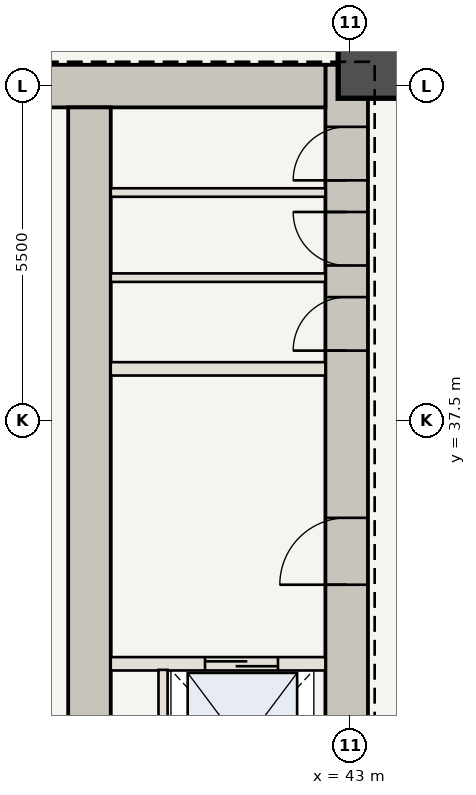
"""IFC4 building model, lengths in metres.
Left out: names, types, materials, properties, quantities, classifications, styles, units other than length and angle.
Written with IfcOpenShell. Run it as: python <this file> out.ifc"""

import sys

from ifc_helpers import new_model, si_unit, direction, frame, frame_2d, origin, origin_2d, place, context, subcontext, project, spatial, rectangle, extrude, element, fill, save


model = new_model("IFC4")
c1 = context("Model", 3, precision=1e-05, world=origin(), true_north=direction((0.0, 1.0)))
c2 = subcontext(c1, "Body", "Model", "MODEL_VIEW")
j1 = project(units=[si_unit("LENGTHUNIT", "METRE"), si_unit("PLANEANGLEUNIT", "RADIAN")], contexts=[c1])
p1 = place(None, origin())
s1 = spatial("IfcSite", under=j1, at=p1, CompositionType="ELEMENT")
p2 = place(p1, origin())
s2 = spatial("IfcBuilding", under=s1, at=p2, CompositionType="ELEMENT")
p3 = place(p2, frame((0.0, 0.0, 52.85)))
s3 = spatial("IfcBuildingStorey", under=s2, at=p3, CompositionType="ELEMENT", Elevation=52.85)
p4 = place(p3, frame((42.94, 30.6, 0.0), z_axis=(0.0, 0.0, 1.0), x_axis=(0.0, 1.0, 0.0)))
e1 = element("IfcWall", 1, at=p4, inside=s3, PredefinedType="SHEAR", context=c2, shape_type="SweptSolid", body=[
    extrude(rectangle(XDim=12.75, YDim=0.7, at=frame_2d((6.375, 0.0))), origin(), (0.0, 0.0, 1.0), 3.5),
])
p5 = place(p4, frame((4.2, 0.0, 0.0)))
e2 = element("IfcOpeningElement", 2, at=p5, cuts=e1, PredefinedType="OPENING", context=c2, shape_type="SweptSolid", body=[
    extrude(rectangle(XDim=1.1, YDim=2.15, at=frame_2d((0.55, 1.075))), frame((0.0, 0.36, 0.0), z_axis=(0.0, -1.0, 0.0), x_axis=(1.0, 0.0, 0.0)), (0.0, 0.0, 1.0), 0.72),
])
p6 = place(p4, frame((8.05, 0.0, 0.0)))
e3 = element("IfcOpeningElement", 3, at=p6, cuts=e1, PredefinedType="OPENING", context=c2, shape_type="SweptSolid", body=[
    extrude(rectangle(XDim=0.88, YDim=2.1, at=frame_2d((0.44, 1.05))), frame((0.0, 0.36, 0.0), z_axis=(0.0, -1.0, 0.0), x_axis=(1.0, 0.0, 0.0)), (0.0, 0.0, 1.0), 0.72),
])
p7 = place(p4, frame((9.45, 0.0, 0.0)))
e4 = element("IfcOpeningElement", 4, at=p7, cuts=e1, PredefinedType="OPENING", context=c2, shape_type="SweptSolid", body=[
    extrude(rectangle(XDim=0.88, YDim=2.1, at=frame_2d((0.44, 1.05))), frame((0.0, 0.36, 0.0), z_axis=(0.0, -1.0, 0.0), x_axis=(1.0, 0.0, 0.0)), (0.0, 0.0, 1.0), 0.72),
])
p8 = place(p4, frame((10.85, 0.0, 0.0)))
e5 = element("IfcOpeningElement", 5, at=p8, cuts=e1, PredefinedType="OPENING", context=c2, shape_type="SweptSolid", body=[
    extrude(rectangle(XDim=0.88, YDim=2.1, at=frame_2d((0.44, 1.05))), frame((0.0, 0.36, 0.0), z_axis=(0.0, -1.0, 0.0), x_axis=(1.0, 0.0, 0.0)), (0.0, 0.0, 1.0), 0.72),
])
p9 = place(p3, frame((37.75, 43.0, 0.0), z_axis=(0.0, 0.0, 1.0), x_axis=(1.0, 0.0, 0.0)))
e6 = element("IfcWall", 6, at=p9, inside=s3, PredefinedType="SHEAR", context=c2, shape_type="SweptSolid", body=[
    extrude(rectangle(XDim=4.84, YDim=0.7, at=frame_2d((2.42, 0.0))), origin(), (0.0, 0.0, 1.0), 3.5),
])
p10 = place(p3, frame((38.71, 30.6, 0.0), z_axis=(0.0, 0.0, 1.0), x_axis=(0.0, 1.0, 0.0)))
e7 = element("IfcWall", 7, at=p10, inside=s3, PredefinedType="SHEAR", context=c2, shape_type="SweptSolid", body=[
    extrude(rectangle(XDim=12.05, YDim=0.7, at=frame_2d((6.025, 0.0))), origin(), (0.0, 0.0, 1.0), 3.5),
])
p11 = place(p3, frame((43.35, 43.35, 0.0), z_axis=(0.0, 0.0, 1.0), x_axis=(1.0, 0.0, 0.0)))
e8 = element("IfcColumn", 8, at=p11, inside=s3, PredefinedType="COLUMN", context=c2, shape_type="SweptSolid", body=[
    extrude(rectangle(XDim=1.1, YDim=1.1, at=origin_2d()), origin(), (0.0, 0.0, 1.0), 3.5),
])
p12 = place(p3, frame((39.06, 33.5, 0.0), z_axis=(0.0, 0.0, 1.0), x_axis=(1.0, 0.0, 0.0)))
e9 = element("IfcWall", 9, at=p12, inside=s3, PredefinedType="STANDARD", context=c2, shape_type="SweptSolid", body=[
    extrude(rectangle(XDim=3.53, YDim=0.22, at=frame_2d((1.765, 0.0))), origin(), (0.0, 0.0, 1.0), 3.32),
])
p13 = place(p12, frame((1.55, 0.0, 0.0)))
e10 = element("IfcOpeningElement", 10, at=p13, cuts=e9, PredefinedType="OPENING", context=c2, shape_type="SweptSolid", body=[
    extrude(rectangle(XDim=1.2, YDim=2.2, at=frame_2d((0.6, 1.1))), frame((0.0, 0.12, 0.0), z_axis=(0.0, -1.0, 0.0), x_axis=(1.0, 0.0, 0.0)), (0.0, 0.0, 1.0), 0.24),
])
p14 = place(p3, frame((39.92, 30.75, 0.0), z_axis=(0.0, 0.0, 1.0), x_axis=(0.0, 1.0, 0.0)))
e11 = element("IfcWall", 11, at=p14, inside=s3, PredefinedType="STANDARD", context=c2, shape_type="SweptSolid", body=[
    extrude(rectangle(XDim=2.65, YDim=0.15, at=frame_2d((1.325, 0.0))), origin(), (0.0, 0.0, 1.0), 3.32),
])
p15 = place(p3, frame((39.06, 38.35, 0.0), z_axis=(0.0, 0.0, 1.0), x_axis=(1.0, 0.0, 0.0)))
e12 = element("IfcWall", 12, at=p15, inside=s3, PredefinedType="STANDARD", context=c2, shape_type="SweptSolid", body=[
    extrude(rectangle(XDim=3.53, YDim=0.22, at=frame_2d((1.765, 0.0))), origin(), (0.0, 0.0, 1.0), 3.32),
])
for number, where, z_axis, x_axis in (
    (13, (39.06, 39.85, 0.0), (0.0, 0.0, 1.0), (1.0, 0.0, 0.0)),
    (14, (39.06, 41.25, 0.0), (0.0, 0.0, 1.0), (1.0, 0.0, 0.0)),
):
    element("IfcWall", number, at=place(p3, frame(where, z_axis=z_axis, x_axis=x_axis)), inside=s3, PredefinedType="STANDARD", context=c2, shape_type="SweptSolid", body=[
        extrude(rectangle(XDim=3.53, YDim=0.14, at=frame_2d((1.765, 0.0))), origin(), (0.0, 0.0, 1.0), 3.32),
    ])
p16 = place(p5, origin())
e15 = element("IfcDoor", 15, at=p16, inside=s3, OperationType="SINGLE_SWING_LEFT", PredefinedType="DOOR", context=c2, shape_type="SweptSolid", body=[
    extrude(rectangle(XDim=1.1, YDim=2.15, at=frame_2d((0.55, 1.075))), frame((0.0, 0.025, 0.0), z_axis=(0.0, -1.0, 0.0), x_axis=(1.0, 0.0, 0.0)), (0.0, 0.0, 1.0), 0.05),
])
fill(e2, e15)
p17 = place(p6, origin())
e16 = element("IfcDoor", 16, at=p17, inside=s3, OperationType="SINGLE_SWING_LEFT", PredefinedType="DOOR", context=c2, shape_type="SweptSolid", body=[
    extrude(rectangle(XDim=0.88, YDim=2.1, at=frame_2d((0.44, 1.05))), frame((0.0, 0.025, 0.0), z_axis=(0.0, -1.0, 0.0), x_axis=(1.0, 0.0, 0.0)), (0.0, 0.0, 1.0), 0.05),
])
fill(e3, e16)
p18 = place(p7, origin())
e17 = element("IfcDoor", 17, at=p18, inside=s3, OperationType="SINGLE_SWING_RIGHT", PredefinedType="DOOR", context=c2, shape_type="SweptSolid", body=[
    extrude(rectangle(XDim=0.88, YDim=2.1, at=frame_2d((0.44, 1.05))), frame((0.0, 0.025, 0.0), z_axis=(0.0, -1.0, 0.0), x_axis=(1.0, 0.0, 0.0)), (0.0, 0.0, 1.0), 0.05),
])
fill(e4, e17)
p19 = place(p8, origin())
e18 = element("IfcDoor", 18, at=p19, inside=s3, OperationType="SINGLE_SWING_LEFT", PredefinedType="DOOR", context=c2, shape_type="SweptSolid", body=[
    extrude(rectangle(XDim=0.88, YDim=2.1, at=frame_2d((0.44, 1.05))), frame((0.0, 0.025, 0.0), z_axis=(0.0, -1.0, 0.0), x_axis=(1.0, 0.0, 0.0)), (0.0, 0.0, 1.0), 0.05),
])
fill(e5, e18)
p20 = place(p13, origin())
e19 = element("IfcDoor", 19, at=p20, inside=s3, OperationType="DOUBLE_DOOR_SLIDING", PredefinedType="DOOR", context=c2, shape_type="SweptSolid", body=[
    extrude(rectangle(XDim=1.2, YDim=2.2, at=frame_2d((0.6, 1.1))), frame((0.0, 0.025, 0.0), z_axis=(0.0, -1.0, 0.0), x_axis=(1.0, 0.0, 0.0)), (0.0, 0.0, 1.0), 0.05),
])
fill(e10, e19)
save(model, sys.argv[1])
